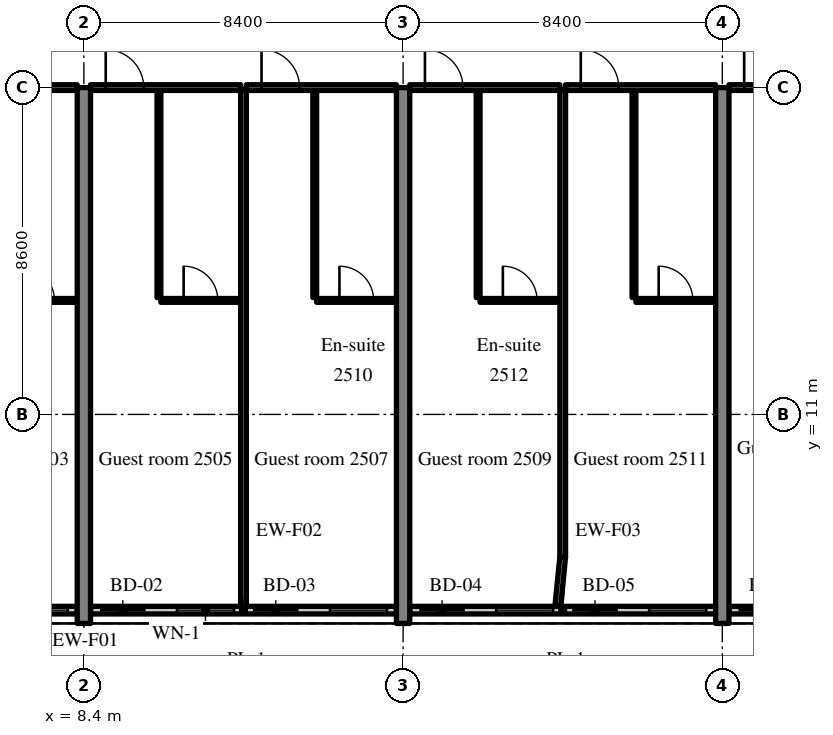
"""IFC4 building model, lengths in metres.
Left out: names, types, materials, properties, quantities, classifications, styles, units other than length and angle.
Written with IfcOpenShell. Run it as: python <this file> out.ifc"""

import sys

from ifc_helpers import new_model, si_unit, direction, frame, frame_2d, origin, place, context, subcontext, project, spatial, rectangle, extrude, source, transform, mapped, element, fill, save


model = new_model("IFC4")
c1 = context("Model", 3, precision=1e-05, world=origin(), true_north=direction((0.0, 1.0)))
c2 = subcontext(c1, "Body", "Model", "MODEL_VIEW")
j1 = project(units=[si_unit("LENGTHUNIT", "METRE"), si_unit("PLANEANGLEUNIT", "RADIAN")], contexts=[c1])
p1 = place(None, origin())
s1 = spatial("IfcSite", under=j1, at=p1, CompositionType="ELEMENT")
p2 = place(p1, origin())
s2 = spatial("IfcBuilding", under=s1, at=p2, CompositionType="ELEMENT")
p3 = place(p2, frame((0.0, 0.0, 106.6)))
s3 = spatial("IfcBuildingStorey", under=s2, at=p3, CompositionType="ELEMENT", Elevation=106.6)
m1 = source(origin(), c2, "Body", "SweptSolid", [
    extrude(rectangle(XDim=14.1, YDim=0.35, at=frame_2d((7.05, 0.0))), origin(), (0.0, 0.0, 1.0), 3.52),
])
for number, where, z_axis, x_axis in (
    (1, (8.4, 5.5, 0.0), (0.0, 0.0, 1.0), (0.0, 1.0, 0.0)),
    (2, (16.8, 5.5, 0.0), (0.0, 0.0, 1.0), (0.0, 1.0, 0.0)),
    (3, (25.2, 5.5, 0.0), (0.0, 0.0, 1.0), (0.0, 1.0, 0.0)),
):
    element("IfcWall", number, at=place(p3, frame(where, z_axis=z_axis, x_axis=x_axis)), inside=s3, PredefinedType="SHEAR", context=c2, shape_type="MappedRepresentation", body=[
        mapped(m1, transform((0.0, 0.0, 0.0), scale=1.0)),
    ])
m2 = source(origin(), c2, "Body", "SweptSolid", [
    extrude(rectangle(XDim=4.08, YDim=0.2, at=frame_2d((2.04, 0.0))), origin(), (0.0, 0.0, 1.0), 2.82),
])
p4 = place(p3, frame((4.145, 5.85, 0.0), z_axis=(0.0, 0.0, 1.0), x_axis=(1.0, 0.0, 0.0)))
e4 = element("IfcWall", 4, at=p4, inside=s3, PredefinedType="SOLIDWALL", context=c2, shape_type="MappedRepresentation", body=[
    mapped(m2, transform((0.0, 0.0, 0.0), scale=1.0)),
])
m3 = source(origin(), c2, "Body", "SweptSolid", [
    extrude(rectangle(XDim=1.2, YDim=2.4, at=frame_2d((0.6, 1.2))), frame((0.0, 0.11, 0.0), z_axis=(0.0, -1.0, 0.0), x_axis=(1.0, 0.0, 0.0)), (0.0, 0.0, 1.0), 0.22),
])
p5 = place(p4, frame((0.25, 0.0, 0.0)))
e5 = element("IfcOpeningElement", 5, at=p5, cuts=e4, PredefinedType="OPENING", context=c2, shape_type="MappedRepresentation", body=[
    mapped(m3, transform((0.0, 0.0, 0.0), scale=1.0)),
])
m4 = source(origin(), c2, "Body", "SweptSolid", [
    extrude(rectangle(XDim=1.5, YDim=1.5, at=frame_2d((0.75, 0.75))), frame((0.0, 0.11, 0.0), z_axis=(0.0, -1.0, 0.0), x_axis=(1.0, 0.0, 0.0)), (0.0, 0.0, 1.0), 0.22),
])
p6 = place(p4, frame((2.33, 0.0, 0.9)))
e6 = element("IfcOpeningElement", 6, at=p6, cuts=e4, PredefinedType="OPENING", context=c2, shape_type="MappedRepresentation", body=[
    mapped(m4, transform((0.0, 0.0, 0.0), scale=1.0)),
])
m5 = source(origin(), c2, "Body", "SweptSolid", [
    extrude(rectangle(XDim=8.05, YDim=0.2, at=frame_2d((4.025, 0.0))), origin(), (0.0, 0.0, 1.0), 2.82),
])
p7 = place(p3, frame((8.575, 5.85, 0.0), z_axis=(0.0, 0.0, 1.0), x_axis=(1.0, 0.0, 0.0)))
e7 = element("IfcWall", 7, at=p7, inside=s3, PredefinedType="SOLIDWALL", context=c2, shape_type="MappedRepresentation", body=[
    mapped(m5, transform((0.0, 0.0, 0.0), scale=1.0)),
])
p8 = place(p7, frame((0.25, 0.0, 0.0)))
e8 = element("IfcOpeningElement", 8, at=p8, cuts=e7, PredefinedType="OPENING", context=c2, shape_type="MappedRepresentation", body=[
    mapped(m3, transform((0.0, 0.0, 0.0), scale=1.0)),
])
p9 = place(p7, frame((2.275, 0.0, 0.9)))
e9 = element("IfcOpeningElement", 9, at=p9, cuts=e7, PredefinedType="OPENING", context=c2, shape_type="MappedRepresentation", body=[
    mapped(m4, transform((0.0, 0.0, 0.0), scale=1.0)),
])
p10 = place(p7, frame((4.275, 0.0, 0.0)))
e10 = element("IfcOpeningElement", 10, at=p10, cuts=e7, PredefinedType="OPENING", context=c2, shape_type="MappedRepresentation", body=[
    mapped(m3, transform((0.0, 0.0, 0.0), scale=1.0)),
])
p11 = place(p7, frame((6.3, 0.0, 0.9)))
e11 = element("IfcOpeningElement", 11, at=p11, cuts=e7, PredefinedType="OPENING", context=c2, shape_type="MappedRepresentation", body=[
    mapped(m4, transform((0.0, 0.0, 0.0), scale=1.0)),
])
m6 = source(origin(), c2, "Body", "SweptSolid", [
    extrude(rectangle(XDim=8.05, YDim=0.2, at=frame_2d((4.025, 0.0))), origin(), (0.0, 0.0, 1.0), 2.82),
])
p12 = place(p3, frame((16.975, 5.85, 0.0), z_axis=(0.0, 0.0, 1.0), x_axis=(1.0, 0.0, 0.0)))
e12 = element("IfcWall", 12, at=p12, inside=s3, PredefinedType="SOLIDWALL", context=c2, shape_type="MappedRepresentation", body=[
    mapped(m6, transform((0.0, 0.0, 0.0), scale=1.0)),
])
p13 = place(p12, frame((0.25, 0.0, 0.0)))
e13 = element("IfcOpeningElement", 13, at=p13, cuts=e12, PredefinedType="OPENING", context=c2, shape_type="MappedRepresentation", body=[
    mapped(m3, transform((0.0, 0.0, 0.0), scale=1.0)),
])
p14 = place(p12, frame((2.275, 0.0, 0.9)))
e14 = element("IfcOpeningElement", 14, at=p14, cuts=e12, PredefinedType="OPENING", context=c2, shape_type="MappedRepresentation", body=[
    mapped(m4, transform((0.0, 0.0, 0.0), scale=1.0)),
])
p15 = place(p12, frame((4.275, 0.0, 0.0)))
e15 = element("IfcOpeningElement", 15, at=p15, cuts=e12, PredefinedType="OPENING", context=c2, shape_type="MappedRepresentation", body=[
    mapped(m3, transform((0.0, 0.0, 0.0), scale=1.0)),
])
p16 = place(p12, frame((6.3, 0.0, 0.9)))
e16 = element("IfcOpeningElement", 16, at=p16, cuts=e12, PredefinedType="OPENING", context=c2, shape_type="MappedRepresentation", body=[
    mapped(m4, transform((0.0, 0.0, 0.0), scale=1.0)),
])
p17 = place(p3, frame((25.375, 5.85, 0.0), z_axis=(0.0, 0.0, 1.0), x_axis=(1.0, 0.0, 0.0)))
e17 = element("IfcWall", 17, at=p17, inside=s3, PredefinedType="SOLIDWALL", context=c2, shape_type="MappedRepresentation", body=[
    mapped(m5, transform((0.0, 0.0, 0.0), scale=1.0)),
])
p18 = place(p17, frame((0.25, 0.0, 0.0)))
e18 = element("IfcOpeningElement", 18, at=p18, cuts=e17, PredefinedType="OPENING", context=c2, shape_type="MappedRepresentation", body=[
    mapped(m3, transform((0.0, 0.0, 0.0), scale=1.0)),
])
p19 = place(p17, frame((2.275, 0.0, 0.9)))
e19 = element("IfcOpeningElement", 19, at=p19, cuts=e17, PredefinedType="OPENING", context=c2, shape_type="MappedRepresentation", body=[
    mapped(m4, transform((0.0, 0.0, 0.0), scale=1.0)),
])
p20 = place(p17, frame((4.275, 0.0, 0.0)))
e20 = element("IfcOpeningElement", 20, at=p20, cuts=e17, PredefinedType="OPENING", context=c2, shape_type="MappedRepresentation", body=[
    mapped(m3, transform((0.0, 0.0, 0.0), scale=1.0)),
])
p21 = place(p17, frame((6.3, 0.0, 0.9)))
e21 = element("IfcOpeningElement", 21, at=p21, cuts=e17, PredefinedType="OPENING", context=c2, shape_type="MappedRepresentation", body=[
    mapped(m4, transform((0.0, 0.0, 0.0), scale=1.0)),
])
m7 = source(origin(), c2, "Body", "SweptSolid", [
    extrude(rectangle(XDim=2.1, YDim=0.1, at=frame_2d((1.05, 0.0))), origin(), (0.0, 0.0, 1.0), 3.52),
])
p22 = place(p3, frame((6.125, 14.0, 0.0), z_axis=(0.0, 0.0, 1.0), x_axis=(1.0, 0.0, 0.0)))
e22 = element("IfcWall", 22, at=p22, inside=s3, PredefinedType="PARTITIONING", context=c2, shape_type="MappedRepresentation", body=[
    mapped(m7, transform((0.0, 0.0, 0.0), scale=1.0)),
])
m8 = source(origin(), c2, "Body", "SweptSolid", [
    extrude(rectangle(XDim=0.9, YDim=2.1, at=frame_2d((0.45, 1.05))), frame((0.0, 0.06, 0.0), z_axis=(0.0, -1.0, 0.0), x_axis=(1.0, 0.0, 0.0)), (0.0, 0.0, 1.0), 0.12),
])
p23 = place(p22, frame((0.6, 0.0, 0.0)))
e23 = element("IfcOpeningElement", 23, at=p23, cuts=e22, PredefinedType="OPENING", context=c2, shape_type="MappedRepresentation", body=[
    mapped(m8, transform((0.0, 0.0, 0.0), scale=1.0)),
])
m9 = source(origin(), c2, "Body", "SweptSolid", [
    extrude(rectangle(XDim=3.95, YDim=0.15, at=frame_2d((1.975, 0.0))), origin(), (0.0, 0.0, 1.0), 2.82),
])
p24 = place(p3, frame((4.275, 19.6, 0.0), z_axis=(0.0, 0.0, 1.0), x_axis=(1.0, 0.0, 0.0)))
e24 = element("IfcWall", 24, at=p24, inside=s3, PredefinedType="PARTITIONING", context=c2, shape_type="MappedRepresentation", body=[
    mapped(m9, transform((0.0, 0.0, 0.0), scale=1.0)),
])
m10 = source(origin(), c2, "Body", "SweptSolid", [
    extrude(rectangle(XDim=1.0, YDim=2.1, at=frame_2d((0.5, 1.05))), frame((0.0, 0.085, 0.0), z_axis=(0.0, -1.0, 0.0), x_axis=(1.0, 0.0, 0.0)), (0.0, 0.0, 1.0), 0.17),
])
p25 = place(p24, frame((0.4, 0.0, 0.0)))
e25 = element("IfcOpeningElement", 25, at=p25, cuts=e24, PredefinedType="OPENING", context=c2, shape_type="MappedRepresentation", body=[
    mapped(m10, transform((0.0, 0.0, 0.0), scale=1.0)),
])
m11 = source(origin(), c2, "Body", "SweptSolid", [
    extrude(rectangle(XDim=5.45, YDim=0.1, at=frame_2d((2.725, 0.0))), origin(), (0.0, 0.0, 1.0), 3.52),
])
p26 = place(p3, frame((10.375, 14.075, 0.0), z_axis=(0.0, 0.0, 1.0), x_axis=(0.0, 1.0, 0.0)))
e26 = element("IfcWall", 26, at=p26, inside=s3, PredefinedType="PARTITIONING", context=c2, shape_type="MappedRepresentation", body=[
    mapped(m11, transform((0.0, 0.0, 0.0), scale=1.0)),
])
m12 = source(origin(), c2, "Body", "SweptSolid", [
    extrude(rectangle(XDim=2.1, YDim=0.1, at=frame_2d((1.05, 0.0))), origin(), (0.0, 0.0, 1.0), 3.52),
])
p27 = place(p3, frame((10.425, 14.0, 0.0), z_axis=(0.0, 0.0, 1.0), x_axis=(1.0, 0.0, 0.0)))
e27 = element("IfcWall", 27, at=p27, inside=s3, PredefinedType="PARTITIONING", context=c2, shape_type="MappedRepresentation", body=[
    mapped(m12, transform((0.0, 0.0, 0.0), scale=1.0)),
])
p28 = place(p27, frame((0.6, 0.0, 0.0)))
e28 = element("IfcOpeningElement", 28, at=p28, cuts=e27, PredefinedType="OPENING", context=c2, shape_type="MappedRepresentation", body=[
    mapped(m8, transform((0.0, 0.0, 0.0), scale=1.0)),
])
m13 = source(origin(), c2, "Body", "SweptSolid", [
    extrude(rectangle(XDim=3.95, YDim=0.15, at=frame_2d((1.975, 0.0))), origin(), (0.0, 0.0, 1.0), 2.82),
])
p29 = place(p3, frame((8.575, 19.6, 0.0), z_axis=(0.0, 0.0, 1.0), x_axis=(1.0, 0.0, 0.0)))
e29 = element("IfcWall", 29, at=p29, inside=s3, PredefinedType="PARTITIONING", context=c2, shape_type="MappedRepresentation", body=[
    mapped(m13, transform((0.0, 0.0, 0.0), scale=1.0)),
])
p30 = place(p29, frame((0.4, 0.0, 0.0)))
e30 = element("IfcOpeningElement", 30, at=p30, cuts=e29, PredefinedType="OPENING", context=c2, shape_type="MappedRepresentation", body=[
    mapped(m10, transform((0.0, 0.0, 0.0), scale=1.0)),
])
p31 = place(p3, frame((14.475, 14.075, 0.0), z_axis=(0.0, 0.0, 1.0), x_axis=(0.0, 1.0, 0.0)))
e31 = element("IfcWall", 31, at=p31, inside=s3, PredefinedType="PARTITIONING", context=c2, shape_type="MappedRepresentation", body=[
    mapped(m11, transform((0.0, 0.0, 0.0), scale=1.0)),
])
p32 = place(p3, frame((14.525, 14.0, 0.0), z_axis=(0.0, 0.0, 1.0), x_axis=(1.0, 0.0, 0.0)))
e32 = element("IfcWall", 32, at=p32, inside=s3, PredefinedType="PARTITIONING", context=c2, shape_type="MappedRepresentation", body=[
    mapped(m7, transform((0.0, 0.0, 0.0), scale=1.0)),
])
p33 = place(p32, frame((0.6, 0.0, 0.0)))
e33 = element("IfcOpeningElement", 33, at=p33, cuts=e32, PredefinedType="OPENING", context=c2, shape_type="MappedRepresentation", body=[
    mapped(m8, transform((0.0, 0.0, 0.0), scale=1.0)),
])
p34 = place(p3, frame((12.675, 19.6, 0.0), z_axis=(0.0, 0.0, 1.0), x_axis=(1.0, 0.0, 0.0)))
e34 = element("IfcWall", 34, at=p34, inside=s3, PredefinedType="PARTITIONING", context=c2, shape_type="MappedRepresentation", body=[
    mapped(m13, transform((0.0, 0.0, 0.0), scale=1.0)),
])
p35 = place(p34, frame((0.4, 0.0, 0.0)))
e35 = element("IfcOpeningElement", 35, at=p35, cuts=e34, PredefinedType="OPENING", context=c2, shape_type="MappedRepresentation", body=[
    mapped(m10, transform((0.0, 0.0, 0.0), scale=1.0)),
])
m14 = source(origin(), c2, "Body", "SweptSolid", [
    extrude(rectangle(XDim=13.575, YDim=0.15, at=frame_2d((6.788, 0.0))), origin(), (0.0, 0.0, 1.0), 3.52),
])
p36 = place(p3, frame((12.6, 5.95, 0.0), z_axis=(0.0, 0.0, 1.0), x_axis=(0.0, 1.0, 0.0)))
e36 = element("IfcWall", 36, at=p36, inside=s3, PredefinedType="PARTITIONING", context=c2, shape_type="MappedRepresentation", body=[
    mapped(m14, transform((0.0, 0.0, 0.0), scale=1.0)),
])
p37 = place(p3, frame((18.775, 14.075, 0.0), z_axis=(0.0, 0.0, 1.0), x_axis=(0.0, 1.0, 0.0)))
e37 = element("IfcWall", 37, at=p37, inside=s3, PredefinedType="PARTITIONING", context=c2, shape_type="MappedRepresentation", body=[
    mapped(m11, transform((0.0, 0.0, 0.0), scale=1.0)),
])
p38 = place(p3, frame((18.825, 14.0, 0.0), z_axis=(0.0, 0.0, 1.0), x_axis=(1.0, 0.0, 0.0)))
e38 = element("IfcWall", 38, at=p38, inside=s3, PredefinedType="PARTITIONING", context=c2, shape_type="MappedRepresentation", body=[
    mapped(m7, transform((0.0, 0.0, 0.0), scale=1.0)),
])
p39 = place(p38, frame((0.6, 0.0, 0.0)))
e39 = element("IfcOpeningElement", 39, at=p39, cuts=e38, PredefinedType="OPENING", context=c2, shape_type="MappedRepresentation", body=[
    mapped(m8, transform((0.0, 0.0, 0.0), scale=1.0)),
])
p40 = place(p3, frame((16.975, 19.6, 0.0), z_axis=(0.0, 0.0, 1.0), x_axis=(1.0, 0.0, 0.0)))
e40 = element("IfcWall", 40, at=p40, inside=s3, PredefinedType="PARTITIONING", context=c2, shape_type="MappedRepresentation", body=[
    mapped(m13, transform((0.0, 0.0, 0.0), scale=1.0)),
])
p41 = place(p40, frame((0.4, 0.0, 0.0)))
e41 = element("IfcOpeningElement", 41, at=p41, cuts=e40, PredefinedType="OPENING", context=c2, shape_type="MappedRepresentation", body=[
    mapped(m10, transform((0.0, 0.0, 0.0), scale=1.0)),
])
p42 = place(p3, frame((22.875, 14.075, 0.0), z_axis=(0.0, 0.0, 1.0), x_axis=(0.0, 1.0, 0.0)))
e42 = element("IfcWall", 42, at=p42, inside=s3, PredefinedType="PARTITIONING", context=c2, shape_type="MappedRepresentation", body=[
    mapped(m11, transform((0.0, 0.0, 0.0), scale=1.0)),
])
p43 = place(p3, frame((22.925, 14.0, 0.0), z_axis=(0.0, 0.0, 1.0), x_axis=(1.0, 0.0, 0.0)))
e43 = element("IfcWall", 43, at=p43, inside=s3, PredefinedType="PARTITIONING", context=c2, shape_type="MappedRepresentation", body=[
    mapped(m12, transform((0.0, 0.0, 0.0), scale=1.0)),
])
p44 = place(p43, frame((0.6, 0.0, 0.0)))
e44 = element("IfcOpeningElement", 44, at=p44, cuts=e43, PredefinedType="OPENING", context=c2, shape_type="MappedRepresentation", body=[
    mapped(m8, transform((0.0, 0.0, 0.0), scale=1.0)),
])
p45 = place(p3, frame((21.075, 19.6, 0.0), z_axis=(0.0, 0.0, 1.0), x_axis=(1.0, 0.0, 0.0)))
e45 = element("IfcWall", 45, at=p45, inside=s3, PredefinedType="PARTITIONING", context=c2, shape_type="MappedRepresentation", body=[
    mapped(m13, transform((0.0, 0.0, 0.0), scale=1.0)),
])
p46 = place(p45, frame((0.4, 0.0, 0.0)))
e46 = element("IfcOpeningElement", 46, at=p46, cuts=e45, PredefinedType="OPENING", context=c2, shape_type="MappedRepresentation", body=[
    mapped(m10, transform((0.0, 0.0, 0.0), scale=1.0)),
])
m15 = source(origin(), c2, "Body", "SweptSolid", [
    extrude(rectangle(XDim=12.275, YDim=0.15, at=frame_2d((6.137, 0.0))), origin(), (0.0, 0.0, 1.0), 3.52),
])
p47 = place(p3, frame((21.0, 7.25, 0.0), z_axis=(0.0, 0.0, 1.0), x_axis=(0.0, 1.0, 0.0)))
e47 = element("IfcWall", 47, at=p47, inside=s3, PredefinedType="PARTITIONING", context=c2, shape_type="MappedRepresentation", body=[
    mapped(m15, transform((0.0, 0.0, 0.0), scale=1.0)),
])
p48 = place(p3, frame((25.375, 19.6, 0.0), z_axis=(0.0, 0.0, 1.0), x_axis=(1.0, 0.0, 0.0)))
e48 = element("IfcWall", 48, at=p48, inside=s3, PredefinedType="PARTITIONING", context=c2, shape_type="MappedRepresentation", body=[
    mapped(m13, transform((0.0, 0.0, 0.0), scale=1.0)),
])
p49 = place(p48, frame((0.4, 0.0, 0.0)))
e49 = element("IfcOpeningElement", 49, at=p49, cuts=e48, PredefinedType="OPENING", context=c2, shape_type="MappedRepresentation", body=[
    mapped(m10, transform((0.0, 0.0, 0.0), scale=1.0)),
])
m16 = source(origin(), c2, "Body", "SweptSolid", [
    extrude(rectangle(XDim=1.307, YDim=0.15, at=frame_2d((0.653, 0.0))), origin(), (0.0, 0.0, 1.0), 3.52),
])
p50 = place(p3, frame((20.87, 5.95, 0.0), z_axis=(0.0, 0.0, 1.0), x_axis=(0.099411212066, 0.995046436562, 0.0)))
e50 = element("IfcWall", 50, at=p50, inside=s3, PredefinedType="PARTITIONING", context=c2, shape_type="MappedRepresentation", body=[
    mapped(m16, transform((0.0, 0.0, 0.0), scale=1.0)),
])
m17 = source(origin(), c2, "Body", "SweptSolid", [
    extrude(rectangle(XDim=1.5, YDim=1.5, at=frame_2d((0.75, 0.75))), frame((0.0, 0.03, 0.0), z_axis=(0.0, -1.0, 0.0), x_axis=(1.0, 0.0, 0.0)), (0.0, 0.0, 1.0), 0.06),
])
p51 = place(p6, origin())
e51 = element("IfcWindow", 51, at=p51, inside=s3, PartitioningType="SINGLE_PANEL", PredefinedType="WINDOW", context=c2, shape_type="MappedRepresentation", body=[
    mapped(m17, transform((0.0, 0.0, 0.0), scale=1.0)),
])
fill(e6, e51)
m18 = source(origin(), c2, "Body", "SweptSolid", [
    extrude(rectangle(XDim=1.2, YDim=2.4, at=frame_2d((0.6, 1.2))), frame((0.0, 0.025, 0.0), z_axis=(0.0, -1.0, 0.0), x_axis=(1.0, 0.0, 0.0)), (0.0, 0.0, 1.0), 0.05),
])
p52 = place(p8, origin())
e52 = element("IfcDoor", 52, at=p52, inside=s3, OperationType="SLIDING_TO_RIGHT", PredefinedType="DOOR", context=c2, shape_type="MappedRepresentation", body=[
    mapped(m18, transform((0.0, 0.0, 0.0), scale=1.0)),
])
fill(e8, e52)
p53 = place(p9, origin())
e53 = element("IfcWindow", 53, at=p53, inside=s3, PartitioningType="SINGLE_PANEL", PredefinedType="WINDOW", context=c2, shape_type="MappedRepresentation", body=[
    mapped(m17, transform((0.0, 0.0, 0.0), scale=1.0)),
])
fill(e9, e53)
p54 = place(p10, origin())
e54 = element("IfcDoor", 54, at=p54, inside=s3, OperationType="SLIDING_TO_LEFT", PredefinedType="DOOR", context=c2, shape_type="MappedRepresentation", body=[
    mapped(m18, transform((0.0, 0.0, 0.0), scale=1.0)),
])
fill(e10, e54)
p55 = place(p11, origin())
e55 = element("IfcWindow", 55, at=p55, inside=s3, PartitioningType="SINGLE_PANEL", PredefinedType="WINDOW", context=c2, shape_type="MappedRepresentation", body=[
    mapped(m17, transform((0.0, 0.0, 0.0), scale=1.0)),
])
fill(e11, e55)
p56 = place(p13, origin())
e56 = element("IfcDoor", 56, at=p56, inside=s3, OperationType="SLIDING_TO_RIGHT", PredefinedType="DOOR", context=c2, shape_type="MappedRepresentation", body=[
    mapped(m18, transform((0.0, 0.0, 0.0), scale=1.0)),
])
fill(e13, e56)
p57 = place(p14, origin())
e57 = element("IfcWindow", 57, at=p57, inside=s3, PartitioningType="SINGLE_PANEL", PredefinedType="WINDOW", context=c2, shape_type="MappedRepresentation", body=[
    mapped(m17, transform((0.0, 0.0, 0.0), scale=1.0)),
])
fill(e14, e57)
p58 = place(p15, origin())
e58 = element("IfcDoor", 58, at=p58, inside=s3, OperationType="SLIDING_TO_LEFT", PredefinedType="DOOR", context=c2, shape_type="MappedRepresentation", body=[
    mapped(m18, transform((0.0, 0.0, 0.0), scale=1.0)),
])
fill(e15, e58)
p59 = place(p16, origin())
e59 = element("IfcWindow", 59, at=p59, inside=s3, PartitioningType="SINGLE_PANEL", PredefinedType="WINDOW", context=c2, shape_type="MappedRepresentation", body=[
    mapped(m17, transform((0.0, 0.0, 0.0), scale=1.0)),
])
fill(e16, e59)
p60 = place(p18, origin())
e60 = element("IfcDoor", 60, at=p60, inside=s3, OperationType="SLIDING_TO_RIGHT", PredefinedType="DOOR", context=c2, shape_type="MappedRepresentation", body=[
    mapped(m18, transform((0.0, 0.0, 0.0), scale=1.0)),
])
fill(e18, e60)
m19 = source(origin(), c2, "Body", "SweptSolid", [
    extrude(rectangle(XDim=0.9, YDim=2.1, at=frame_2d((0.45, 1.05))), frame((0.0, 0.025, 0.0), z_axis=(0.0, -1.0, 0.0), x_axis=(1.0, 0.0, 0.0)), (0.0, 0.0, 1.0), 0.05),
])
p61 = place(p23, origin())
e61 = element("IfcDoor", 61, at=p61, inside=s3, OperationType="SINGLE_SWING_LEFT", PredefinedType="DOOR", context=c2, shape_type="MappedRepresentation", body=[
    mapped(m19, transform((0.0, 0.0, 0.0), scale=1.0)),
])
fill(e23, e61)
p62 = place(p28, origin())
e62 = element("IfcDoor", 62, at=p62, inside=s3, OperationType="SINGLE_SWING_LEFT", PredefinedType="DOOR", context=c2, shape_type="MappedRepresentation", body=[
    mapped(m19, transform((0.0, 0.0, 0.0), scale=1.0)),
])
fill(e28, e62)
m20 = source(origin(), c2, "Body", "SweptSolid", [
    extrude(rectangle(XDim=1.0, YDim=2.1, at=frame_2d((0.5, 1.05))), frame((0.0, 0.025, 0.0), z_axis=(0.0, -1.0, 0.0), x_axis=(1.0, 0.0, 0.0)), (0.0, 0.0, 1.0), 0.05),
])
p63 = place(p30, origin())
e63 = element("IfcDoor", 63, at=p63, inside=s3, OperationType="SINGLE_SWING_LEFT", PredefinedType="DOOR", context=c2, shape_type="MappedRepresentation", body=[
    mapped(m20, transform((0.0, 0.0, 0.0), scale=1.0)),
])
fill(e30, e63)
p64 = place(p33, origin())
e64 = element("IfcDoor", 64, at=p64, inside=s3, OperationType="SINGLE_SWING_LEFT", PredefinedType="DOOR", context=c2, shape_type="MappedRepresentation", body=[
    mapped(m19, transform((0.0, 0.0, 0.0), scale=1.0)),
])
fill(e33, e64)
p65 = place(p35, origin())
e65 = element("IfcDoor", 65, at=p65, inside=s3, OperationType="SINGLE_SWING_LEFT", PredefinedType="DOOR", context=c2, shape_type="MappedRepresentation", body=[
    mapped(m20, transform((0.0, 0.0, 0.0), scale=1.0)),
])
fill(e35, e65)
p66 = place(p39, origin())
e66 = element("IfcDoor", 66, at=p66, inside=s3, OperationType="SINGLE_SWING_LEFT", PredefinedType="DOOR", context=c2, shape_type="MappedRepresentation", body=[
    mapped(m19, transform((0.0, 0.0, 0.0), scale=1.0)),
])
fill(e39, e66)
p67 = place(p41, origin())
e67 = element("IfcDoor", 67, at=p67, inside=s3, OperationType="SINGLE_SWING_LEFT", PredefinedType="DOOR", context=c2, shape_type="MappedRepresentation", body=[
    mapped(m20, transform((0.0, 0.0, 0.0), scale=1.0)),
])
fill(e41, e67)
p68 = place(p44, origin())
e68 = element("IfcDoor", 68, at=p68, inside=s3, OperationType="SINGLE_SWING_LEFT", PredefinedType="DOOR", context=c2, shape_type="MappedRepresentation", body=[
    mapped(m19, transform((0.0, 0.0, 0.0), scale=1.0)),
])
fill(e44, e68)
p69 = place(p46, origin())
e69 = element("IfcDoor", 69, at=p69, inside=s3, OperationType="SINGLE_SWING_LEFT", PredefinedType="DOOR", context=c2, shape_type="MappedRepresentation", body=[
    mapped(m20, transform((0.0, 0.0, 0.0), scale=1.0)),
])
fill(e46, e69)
p70 = place(p49, origin())
e70 = element("IfcDoor", 70, at=p70, inside=s3, OperationType="SINGLE_SWING_LEFT", PredefinedType="DOOR", context=c2, shape_type="MappedRepresentation", body=[
    mapped(m20, transform((0.0, 0.0, 0.0), scale=1.0)),
])
fill(e49, e70)
save(model, sys.argv[1])
